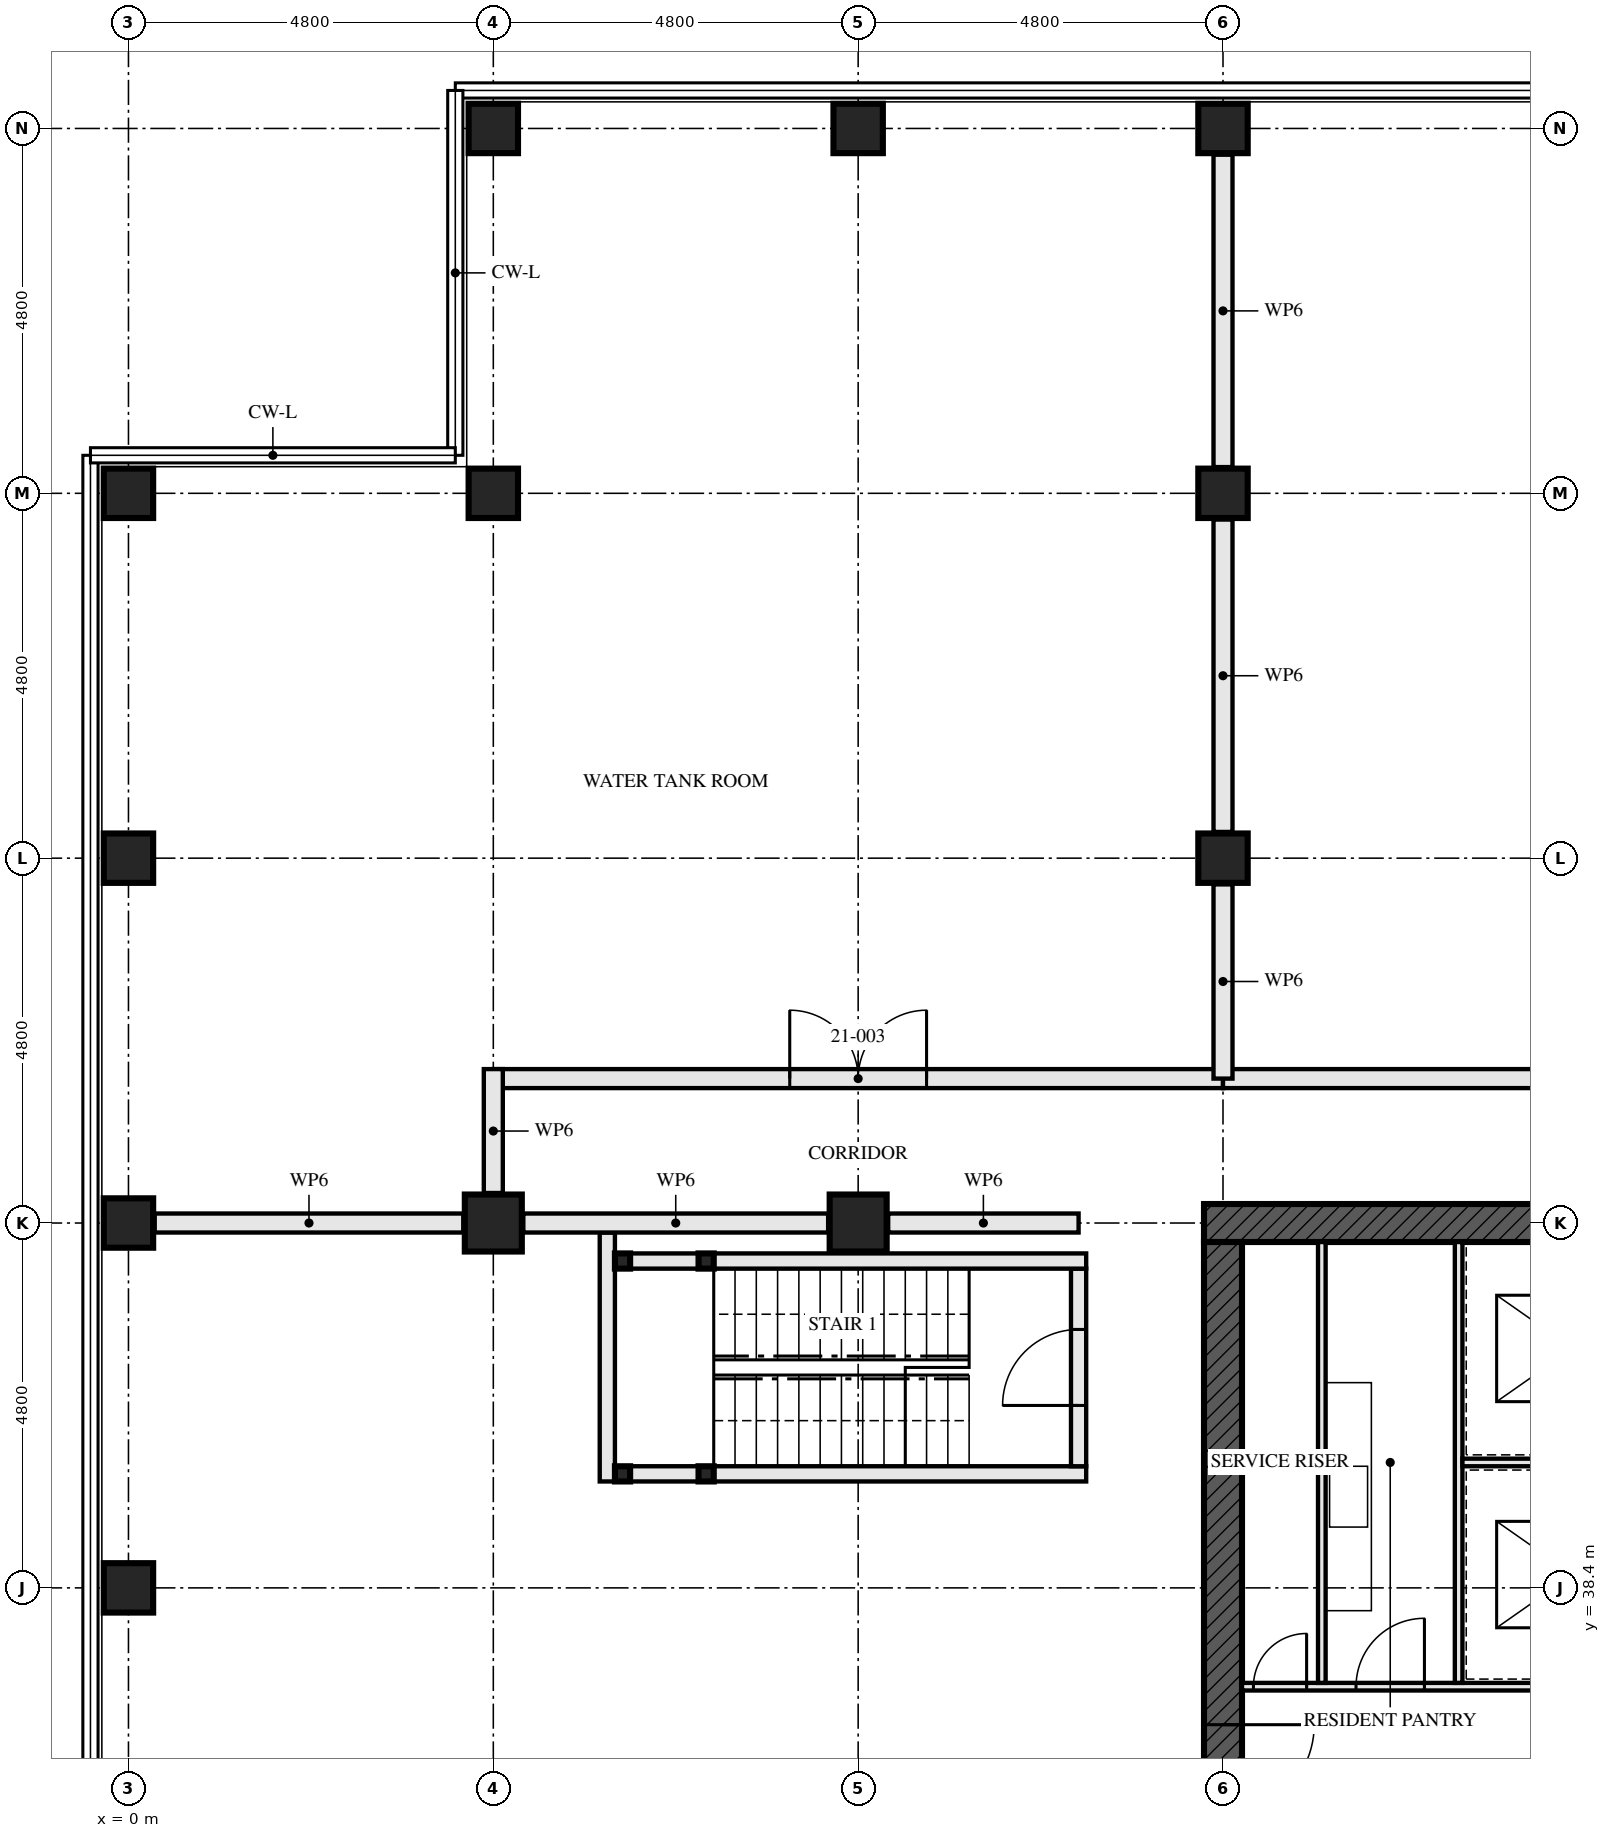
"""IFC4 building model, lengths in metres.
Left out: names, types, materials, properties, quantities, classifications, styles, units other than length and angle.
Written with IfcOpenShell. Run it as: python <this file> out.ifc"""

import sys

from ifc_helpers import new_model, si_unit, direction, frame, frame_2d, origin, origin_2d, place, context, subcontext, project, spatial, rectangle, hollow_rectangle, extrude, element, fill, save


model = new_model("IFC4")
c1 = context("Model", 3, precision=1e-05, world=origin(), true_north=direction((0.0, 1.0)))
c2 = subcontext(c1, "Body", "Model", "MODEL_VIEW")
j1 = project(units=[si_unit("LENGTHUNIT", "METRE"), si_unit("PLANEANGLEUNIT", "RADIAN")], contexts=[c1])
p1 = place(None, origin())
s1 = spatial("IfcSite", under=j1, at=p1, CompositionType="ELEMENT")
p2 = place(p1, origin())
s2 = spatial("IfcBuilding", under=s1, at=p2, CompositionType="ELEMENT")
p3 = place(p2, frame((0.0, 0.0, 79.5)))
s3 = spatial("IfcBuildingStorey", under=s2, at=p3, CompositionType="ELEMENT", Elevation=79.5)
for number, where, z_axis, x_axis in (
    (1, (0.0, 38.4, 0.0), (0.0, 0.0, 1.0), (1.0, 0.0, 0.0)),
    (2, (0.0, 43.2, 0.0), (0.0, 0.0, 1.0), (0.0, 1.0, 0.0)),
    (3, (0.0, 48.0, 0.0), (0.0, 0.0, 1.0), (1.0, 0.0, 0.0)),
    (4, (0.0, 52.8, 0.0), (0.0, 0.0, 1.0), (0.0, 1.0, 0.0)),
):
    element("IfcColumn", number, at=place(p3, frame(where, z_axis=z_axis, x_axis=x_axis)), inside=s3, PredefinedType="COLUMN", context=c2, shape_type="SweptSolid", body=[
        extrude(hollow_rectangle(XDim=0.65, YDim=0.65, WallThickness=0.08, at=origin_2d()), origin(), (0.0, 0.0, 1.0), 4.5),
    ])
p4 = place(p3, frame((4.8, 43.2, 0.0), z_axis=(0.0, 0.0, 1.0), x_axis=(0.0, 1.0, 0.0)))
e5 = element("IfcColumn", 5, at=p4, inside=s3, PredefinedType="COLUMN", context=c2, shape_type="SweptSolid", body=[
    extrude(hollow_rectangle(XDim=0.75, YDim=0.75, WallThickness=0.08, at=origin_2d()), origin(), (0.0, 0.0, 1.0), 4.5),
])
for number, where, z_axis, x_axis in (
    (6, (4.8, 52.8, 0.0), (0.0, 0.0, 1.0), (0.0, 1.0, 0.0)),
    (7, (4.8, 57.6, 0.0), (0.0, 0.0, 1.0), (0.0, 1.0, 0.0)),
):
    element("IfcColumn", number, at=place(p3, frame(where, z_axis=z_axis, x_axis=x_axis)), inside=s3, PredefinedType="COLUMN", context=c2, shape_type="SweptSolid", body=[
        extrude(hollow_rectangle(XDim=0.65, YDim=0.65, WallThickness=0.08, at=origin_2d()), origin(), (0.0, 0.0, 1.0), 4.5),
    ])
p5 = place(p3, frame((9.6, 43.2, 0.0), z_axis=(0.0, 0.0, 1.0), x_axis=(0.0, 1.0, 0.0)))
e8 = element("IfcColumn", 8, at=p5, inside=s3, PredefinedType="COLUMN", context=c2, shape_type="SweptSolid", body=[
    extrude(hollow_rectangle(XDim=0.75, YDim=0.75, WallThickness=0.08, at=origin_2d()), origin(), (0.0, 0.0, 1.0), 4.5),
])
p6 = place(p3, frame((9.6, 57.6, 0.0), z_axis=(0.0, 0.0, 1.0), x_axis=(0.0, 1.0, 0.0)))
e9 = element("IfcColumn", 9, at=p6, inside=s3, PredefinedType="COLUMN", context=c2, shape_type="SweptSolid", body=[
    extrude(hollow_rectangle(XDim=0.65, YDim=0.65, WallThickness=0.08, at=origin_2d()), origin(), (0.0, 0.0, 1.0), 4.5),
])
for number, where, z_axis, x_axis in (
    (10, (14.4, 48.0, 0.0), (0.0, 0.0, 1.0), (1.0, 0.0, 0.0)),
    (11, (14.4, 52.8, 0.0), (0.0, 0.0, 1.0), (1.0, 0.0, 0.0)),
):
    element("IfcColumn", number, at=place(p3, frame(where, z_axis=z_axis, x_axis=x_axis)), inside=s3, PredefinedType="COLUMN", context=c2, shape_type="SweptSolid", body=[
        extrude(hollow_rectangle(XDim=0.65, YDim=0.65, WallThickness=0.05, at=origin_2d()), origin(), (0.0, 0.0, 1.0), 4.5),
    ])
p7 = place(p3, frame((14.4, 57.6, 0.0), z_axis=(0.0, 0.0, 1.0), x_axis=(0.0, 1.0, 0.0)))
e12 = element("IfcColumn", 12, at=p7, inside=s3, PredefinedType="COLUMN", context=c2, shape_type="SweptSolid", body=[
    extrude(hollow_rectangle(XDim=0.65, YDim=0.65, WallThickness=0.08, at=origin_2d()), origin(), (0.0, 0.0, 1.0), 4.5),
])
p8 = place(p3, frame((29.05, 43.2, -0.25), z_axis=(0.0, 0.0, 1.0), x_axis=(-1.0, 0.0, 0.0)))
e13 = element("IfcWall", 13, at=p8, inside=s3, PredefinedType="SHEAR", context=c2, shape_type="SweptSolid", body=[
    extrude(rectangle(XDim=14.9, YDim=0.5, at=frame_2d((7.45, 0.0))), origin(), (0.0, 0.0, 1.0), 4.58),
])
p9 = place(p8, frame((6.85, 0.0, 0.25)))
e14 = element("IfcOpeningElement", 14, at=p9, cuts=e13, PredefinedType="OPENING", context=c2, shape_type="SweptSolid", body=[
    extrude(rectangle(XDim=1.2, YDim=2.1, at=frame_2d((0.6, 1.05))), frame((0.0, 0.26, 0.0), z_axis=(0.0, -1.0, 0.0), x_axis=(1.0, 0.0, 0.0)), (0.0, 0.0, 1.0), 0.521),
])
p10 = place(p3, frame((14.4, 42.95, -0.25), z_axis=(0.0, 0.0, 1.0), x_axis=(0.0, -1.0, 0.0)))
e15 = element("IfcWall", 15, at=p10, inside=s3, PredefinedType="SHEAR", context=c2, shape_type="SweptSolid", body=[
    extrude(rectangle(XDim=13.9, YDim=0.5, at=frame_2d((6.95, 0.0))), origin(), (0.0, 0.0, 1.0), 4.58),
])
p11 = place(p10, frame((6.35, 0.0, 0.25)))
e16 = element("IfcOpeningElement", 16, at=p11, cuts=e15, PredefinedType="OPENING", context=c2, shape_type="SweptSolid", body=[
    extrude(rectangle(XDim=1.2, YDim=2.1, at=frame_2d((0.6, 1.05))), frame((0.0, 0.26, 0.0), z_axis=(0.0, -1.0, 0.0), x_axis=(1.0, 0.0, 0.0)), (0.0, 0.0, 1.0), 0.521),
])
for number, where, z_axis, x_axis in (
    (17, (6.5, 42.7, 0.0), (0.0, 0.0, 1.0), (1.0, 0.0, 0.0)),
    (18, (6.5, 39.9, 0.0), (0.0, 0.0, 1.0), (1.0, 0.0, 0.0)),
    (19, (7.6, 42.7, 0.0), (0.0, 0.0, 1.0), (1.0, 0.0, 0.0)),
    (20, (7.6, 39.9, 0.0), (0.0, 0.0, 1.0), (1.0, 0.0, 0.0)),
):
    element("IfcColumn", number, at=place(p3, frame(where, z_axis=z_axis, x_axis=x_axis)), inside=s3, PredefinedType="COLUMN", context=c2, shape_type="SweptSolid", body=[
        extrude(hollow_rectangle(XDim=0.2, YDim=0.2, WallThickness=0.008, at=origin_2d()), origin(), (0.0, 0.0, 1.0), 4.33),
    ])
p12 = place(p3, frame((6.6, 42.7, 0.0), z_axis=(0.0, 0.0, 1.0), x_axis=(1.0, 0.0, 0.0)))
e21 = element("IfcWall", 21, at=p12, inside=s3, PredefinedType="SOLIDWALL", context=c2, shape_type="SweptSolid", body=[
    extrude(rectangle(XDim=0.9, YDim=0.2, at=frame_2d((0.45, 0.0))), origin(), (0.0, 0.0, 1.0), 3.99),
])
p13 = place(p3, frame((7.7, 42.7, 0.0), z_axis=(0.0, 0.0, 1.0), x_axis=(1.0, 0.0, 0.0)))
e22 = element("IfcWall", 22, at=p13, inside=s3, PredefinedType="SOLIDWALL", context=c2, shape_type="SweptSolid", body=[
    extrude(rectangle(XDim=4.9, YDim=0.2, at=frame_2d((2.45, 0.0))), origin(), (0.0, 0.0, 1.0), 3.99),
])
p14 = place(p3, frame((6.6, 39.9, 0.0), z_axis=(0.0, 0.0, 1.0), x_axis=(1.0, 0.0, 0.0)))
e23 = element("IfcWall", 23, at=p14, inside=s3, PredefinedType="SOLIDWALL", context=c2, shape_type="SweptSolid", body=[
    extrude(rectangle(XDim=0.9, YDim=0.2, at=frame_2d((0.45, 0.0))), origin(), (0.0, 0.0, 1.0), 3.99),
])
p15 = place(p3, frame((7.7, 39.9, 0.0), z_axis=(0.0, 0.0, 1.0), x_axis=(1.0, 0.0, 0.0)))
e24 = element("IfcWall", 24, at=p15, inside=s3, PredefinedType="SOLIDWALL", context=c2, shape_type="SweptSolid", body=[
    extrude(rectangle(XDim=4.9, YDim=0.2, at=frame_2d((2.45, 0.0))), origin(), (0.0, 0.0, 1.0), 3.99),
])
p16 = place(p3, frame((6.3, 43.075, 0.0), z_axis=(0.0, 0.0, 1.0), x_axis=(0.0, -1.0, 0.0)))
e25 = element("IfcWall", 25, at=p16, inside=s3, PredefinedType="SOLIDWALL", context=c2, shape_type="SweptSolid", body=[
    extrude(rectangle(XDim=3.275, YDim=0.2, at=frame_2d((1.637, 0.0))), origin(), (0.0, 0.0, 1.0), 4.33),
])
p17 = place(p3, frame((12.5, 42.6, 0.0), z_axis=(0.0, 0.0, 1.0), x_axis=(0.0, -1.0, 0.0)))
e26 = element("IfcWall", 26, at=p17, inside=s3, PredefinedType="SOLIDWALL", context=c2, shape_type="SweptSolid", body=[
    extrude(rectangle(XDim=2.6, YDim=0.2, at=frame_2d((1.3, 0.0))), origin(), (0.0, 0.0, 1.0), 4.33),
])
p18 = place(p17, frame((0.8, 0.0, 0.0)))
e27 = element("IfcOpeningElement", 27, at=p18, cuts=e26, PredefinedType="OPENING", context=c2, shape_type="SweptSolid", body=[
    extrude(rectangle(XDim=1.0, YDim=2.1, at=frame_2d((0.5, 1.05))), frame((0.0, 0.111, 0.0), z_axis=(0.0, -1.0, 0.0), x_axis=(1.0, 0.0, 0.0)), (0.0, 0.0, 1.0), 0.221),
])
p19 = place(p3, frame((14.4, 45.1, 0.0), z_axis=(0.0, 0.0, 1.0), x_axis=(-1.0, 0.0, 0.0)))
e28 = element("IfcWall", 28, at=p19, inside=s3, PredefinedType="SOLIDWALL", context=c2, shape_type="SweptSolid", body=[
    extrude(rectangle(XDim=9.6, YDim=0.25, at=frame_2d((4.8, 0.0))), origin(), (0.0, 0.0, 1.0), 4.33),
])
p20 = place(p19, frame((3.9, 0.0, 0.0)))
e29 = element("IfcOpeningElement", 29, at=p20, cuts=e28, PredefinedType="OPENING", context=c2, shape_type="SweptSolid", body=[
    extrude(rectangle(XDim=1.8, YDim=2.4, at=frame_2d((0.9, 1.2))), frame((0.0, 0.135, 0.0), z_axis=(0.0, -1.0, 0.0), x_axis=(1.0, 0.0, 0.0)), (0.0, 0.0, 1.0), 0.271),
])
p21 = place(p3, frame((4.8, 45.225, 0.0), z_axis=(0.0, 0.0, 1.0), x_axis=(0.0, -1.0, 0.0)))
e30 = element("IfcWall", 30, at=p21, inside=s3, PredefinedType="SOLIDWALL", context=c2, shape_type="SweptSolid", body=[
    extrude(rectangle(XDim=1.63, YDim=0.25, at=frame_2d((0.815, 0.0))), origin(), (0.0, 0.0, 1.0), 4.33),
])
p22 = place(p3, frame((28.8, 45.1, 0.0), z_axis=(0.0, 0.0, 1.0), x_axis=(-1.0, 0.0, 0.0)))
e31 = element("IfcWall", 31, at=p22, inside=s3, PredefinedType="SOLIDWALL", context=c2, shape_type="SweptSolid", body=[
    extrude(rectangle(XDim=14.4, YDim=0.25, at=frame_2d((7.2, 0.0))), origin(), (0.0, 0.0, 1.0), 4.33),
])
p23 = place(p22, frame((6.3, 0.0, 0.0)))
e32 = element("IfcOpeningElement", 32, at=p23, cuts=e31, PredefinedType="OPENING", context=c2, shape_type="SweptSolid", body=[
    extrude(rectangle(XDim=1.8, YDim=2.4, at=frame_2d((0.9, 1.2))), frame((0.0, 0.135, 0.0), z_axis=(0.0, -1.0, 0.0), x_axis=(1.0, 0.0, 0.0)), (0.0, 0.0, 1.0), 0.271),
])
p24 = place(p3, frame((15.7, 37.15, 0.0), z_axis=(0.0, 0.0, 1.0), x_axis=(0.0, 1.0, 0.0)))
e33 = element("IfcWall", 33, at=p24, inside=s3, PredefinedType="SOLIDWALL", context=c2, shape_type="SweptSolid", body=[
    extrude(rectangle(XDim=5.8, YDim=0.1, at=frame_2d((2.9, 0.0))), origin(), (0.0, 0.0, 1.0), 4.33),
])
p25 = place(p3, frame((14.65, 37.1, 0.0), z_axis=(0.0, 0.0, 1.0), x_axis=(1.0, 0.0, 0.0)))
e34 = element("IfcWall", 34, at=p25, inside=s3, PredefinedType="SOLIDWALL", context=c2, shape_type="SweptSolid", body=[
    extrude(rectangle(XDim=5.9, YDim=0.1, at=frame_2d((2.95, 0.0))), origin(), (0.0, 0.0, 1.0), 4.33),
])
p26 = place(p25, frame((0.15, 0.0, 0.0)))
e35 = element("IfcOpeningElement", 35, at=p26, cuts=e34, PredefinedType="OPENING", context=c2, shape_type="SweptSolid", body=[
    extrude(rectangle(XDim=0.7, YDim=2.1, at=frame_2d((0.35, 1.05))), frame((0.0, 0.061, 0.0), z_axis=(0.0, -1.0, 0.0), x_axis=(1.0, 0.0, 0.0)), (0.0, 0.0, 1.0), 0.121),
])
p27 = place(p25, frame((1.5, 0.0, 0.0)))
e36 = element("IfcOpeningElement", 36, at=p27, cuts=e34, PredefinedType="OPENING", context=c2, shape_type="SweptSolid", body=[
    extrude(rectangle(XDim=0.9, YDim=2.1, at=frame_2d((0.45, 1.05))), frame((0.0, 0.061, 0.0), z_axis=(0.0, -1.0, 0.0), x_axis=(1.0, 0.0, 0.0)), (0.0, 0.0, 1.0), 0.121),
])
p28 = place(p3, frame((17.5, 37.15, 0.0), z_axis=(0.0, 0.0, 1.0), x_axis=(0.0, 1.0, 0.0)))
e37 = element("IfcWall", 37, at=p28, inside=s3, PredefinedType="SOLIDWALL", context=c2, shape_type="SweptSolid", body=[
    extrude(rectangle(XDim=5.8, YDim=0.1, at=frame_2d((2.9, 0.0))), origin(), (0.0, 0.0, 1.0), 4.33),
])
p29 = place(p3, frame((17.55, 40.05, 0.0), z_axis=(0.0, 0.0, 1.0), x_axis=(1.0, 0.0, 0.0)))
e38 = element("IfcWall", 38, at=p29, inside=s3, PredefinedType="SOLIDWALL", context=c2, shape_type="SweptSolid", body=[
    extrude(rectangle(XDim=2.9, YDim=0.1, at=frame_2d((1.45, 0.0))), origin(), (0.0, 0.0, 1.0), 4.33),
])
p30 = place(p3, frame((12.5, 43.2, 0.0), z_axis=(0.0, 0.0, 1.0), x_axis=(-1.0, 0.0, 0.0)))
e39 = element("IfcWall", 39, at=p30, inside=s3, PredefinedType="SOLIDWALL", context=c2, shape_type="SweptSolid", body=[
    extrude(rectangle(XDim=2.505, YDim=0.25, at=frame_2d((1.252, 0.0))), origin(), (0.0, 0.0, 1.0), 3.12),
])
p31 = place(p3, frame((9.205, 43.2, 0.0), z_axis=(0.0, 0.0, 1.0), x_axis=(-1.0, 0.0, 0.0)))
e40 = element("IfcWall", 40, at=p31, inside=s3, PredefinedType="SOLIDWALL", context=c2, shape_type="SweptSolid", body=[
    extrude(rectangle(XDim=4.01, YDim=0.25, at=frame_2d((2.005, 0.0))), origin(), (0.0, 0.0, 1.0), 3.12),
])
p32 = place(p3, frame((4.405, 43.2, 0.0), z_axis=(0.0, 0.0, 1.0), x_axis=(-1.0, 0.0, 0.0)))
e41 = element("IfcWall", 41, at=p32, inside=s3, PredefinedType="SOLIDWALL", context=c2, shape_type="SweptSolid", body=[
    extrude(rectangle(XDim=4.06, YDim=0.25, at=frame_2d((2.03, 0.0))), origin(), (0.0, 0.0, 1.0), 3.12),
])
p33 = place(p3, frame((14.4, 45.1, 0.0), z_axis=(0.0, 0.0, 1.0), x_axis=(0.0, 1.0, 0.0)))
e42 = element("IfcWall", 42, at=p33, inside=s3, PredefinedType="SOLIDWALL", context=c2, shape_type="SweptSolid", body=[
    extrude(rectangle(XDim=2.555, YDim=0.25, at=frame_2d((1.277, 0.0))), origin(), (0.0, 0.0, 1.0), 2.82),
])
p34 = place(p3, frame((14.4, 48.345, 0.0), z_axis=(0.0, 0.0, 1.0), x_axis=(0.0, 1.0, 0.0)))
e43 = element("IfcWall", 43, at=p34, inside=s3, PredefinedType="SOLIDWALL", context=c2, shape_type="SweptSolid", body=[
    extrude(rectangle(XDim=4.11, YDim=0.25, at=frame_2d((2.055, 0.0))), origin(), (0.0, 0.0, 1.0), 2.82),
])
p35 = place(p3, frame((14.4, 53.145, 0.0), z_axis=(0.0, 0.0, 1.0), x_axis=(0.0, 1.0, 0.0)))
e44 = element("IfcWall", 44, at=p35, inside=s3, PredefinedType="SOLIDWALL", context=c2, shape_type="SweptSolid", body=[
    extrude(rectangle(XDim=4.11, YDim=0.25, at=frame_2d((2.055, 0.0))), origin(), (0.0, 0.0, 1.0), 2.82),
])
p36 = place(p18, frame((1.0, 0.0, 0.0), z_axis=(0.0, 0.0, 1.0), x_axis=(-1.0, 0.0, 0.0)))
e45 = element("IfcDoor", 45, at=p36, inside=s3, OperationType="SINGLE_SWING_RIGHT", PredefinedType="DOOR", context=c2, shape_type="SweptSolid", body=[
    extrude(rectangle(XDim=1.0, YDim=2.1, at=frame_2d((0.5, 1.05))), frame((0.0, 0.032, 0.0), z_axis=(0.0, -1.0, 0.0), x_axis=(1.0, 0.0, 0.0)), (0.0, 0.0, 1.0), 0.064),
])
fill(e27, e45)
p37 = place(p20, frame((1.8, 0.0, 0.0), z_axis=(0.0, 0.0, 1.0), x_axis=(-1.0, 0.0, 0.0)))
e46 = element("IfcDoor", 46, at=p37, inside=s3, OperationType="DOUBLE_DOOR_SINGLE_SWING", PredefinedType="DOOR", context=c2, shape_type="SweptSolid", body=[
    extrude(rectangle(XDim=1.8, YDim=2.4, at=frame_2d((0.9, 1.2))), frame((0.0, 0.032, 0.0), z_axis=(0.0, -1.0, 0.0), x_axis=(1.0, 0.0, 0.0)), (0.0, 0.0, 1.0), 0.064),
])
fill(e29, e46)
p38 = place(p26, origin())
e47 = element("IfcDoor", 47, at=p38, inside=s3, OperationType="SINGLE_SWING_LEFT", PredefinedType="DOOR", context=c2, shape_type="SweptSolid", body=[
    extrude(rectangle(XDim=0.7, YDim=2.1, at=frame_2d((0.35, 1.05))), frame((0.0, 0.027, 0.0), z_axis=(0.0, -1.0, 0.0), x_axis=(1.0, 0.0, 0.0)), (0.0, 0.0, 1.0), 0.054),
])
fill(e35, e47)
p39 = place(p27, origin())
e48 = element("IfcDoor", 48, at=p39, inside=s3, OperationType="SINGLE_SWING_LEFT", PredefinedType="DOOR", context=c2, shape_type="SweptSolid", body=[
    extrude(rectangle(XDim=0.9, YDim=2.1, at=frame_2d((0.45, 1.05))), frame((0.0, 0.027, 0.0), z_axis=(0.0, -1.0, 0.0), x_axis=(1.0, 0.0, 0.0)), (0.0, 0.0, 1.0), 0.054),
])
fill(e36, e48)
p40 = place(p11, origin())
e49 = element("IfcDoor", 49, at=p40, inside=s3, OperationType="SINGLE_SWING_LEFT", PredefinedType="DOOR", context=c2, shape_type="SweptSolid", body=[
    extrude(rectangle(XDim=1.2, YDim=2.1, at=frame_2d((0.6, 1.05))), frame((0.0, 0.027, 0.0), z_axis=(0.0, -1.0, 0.0), x_axis=(1.0, 0.0, 0.0)), (0.0, 0.0, 1.0), 0.054),
])
fill(e16, e49)
save(model, sys.argv[1])
